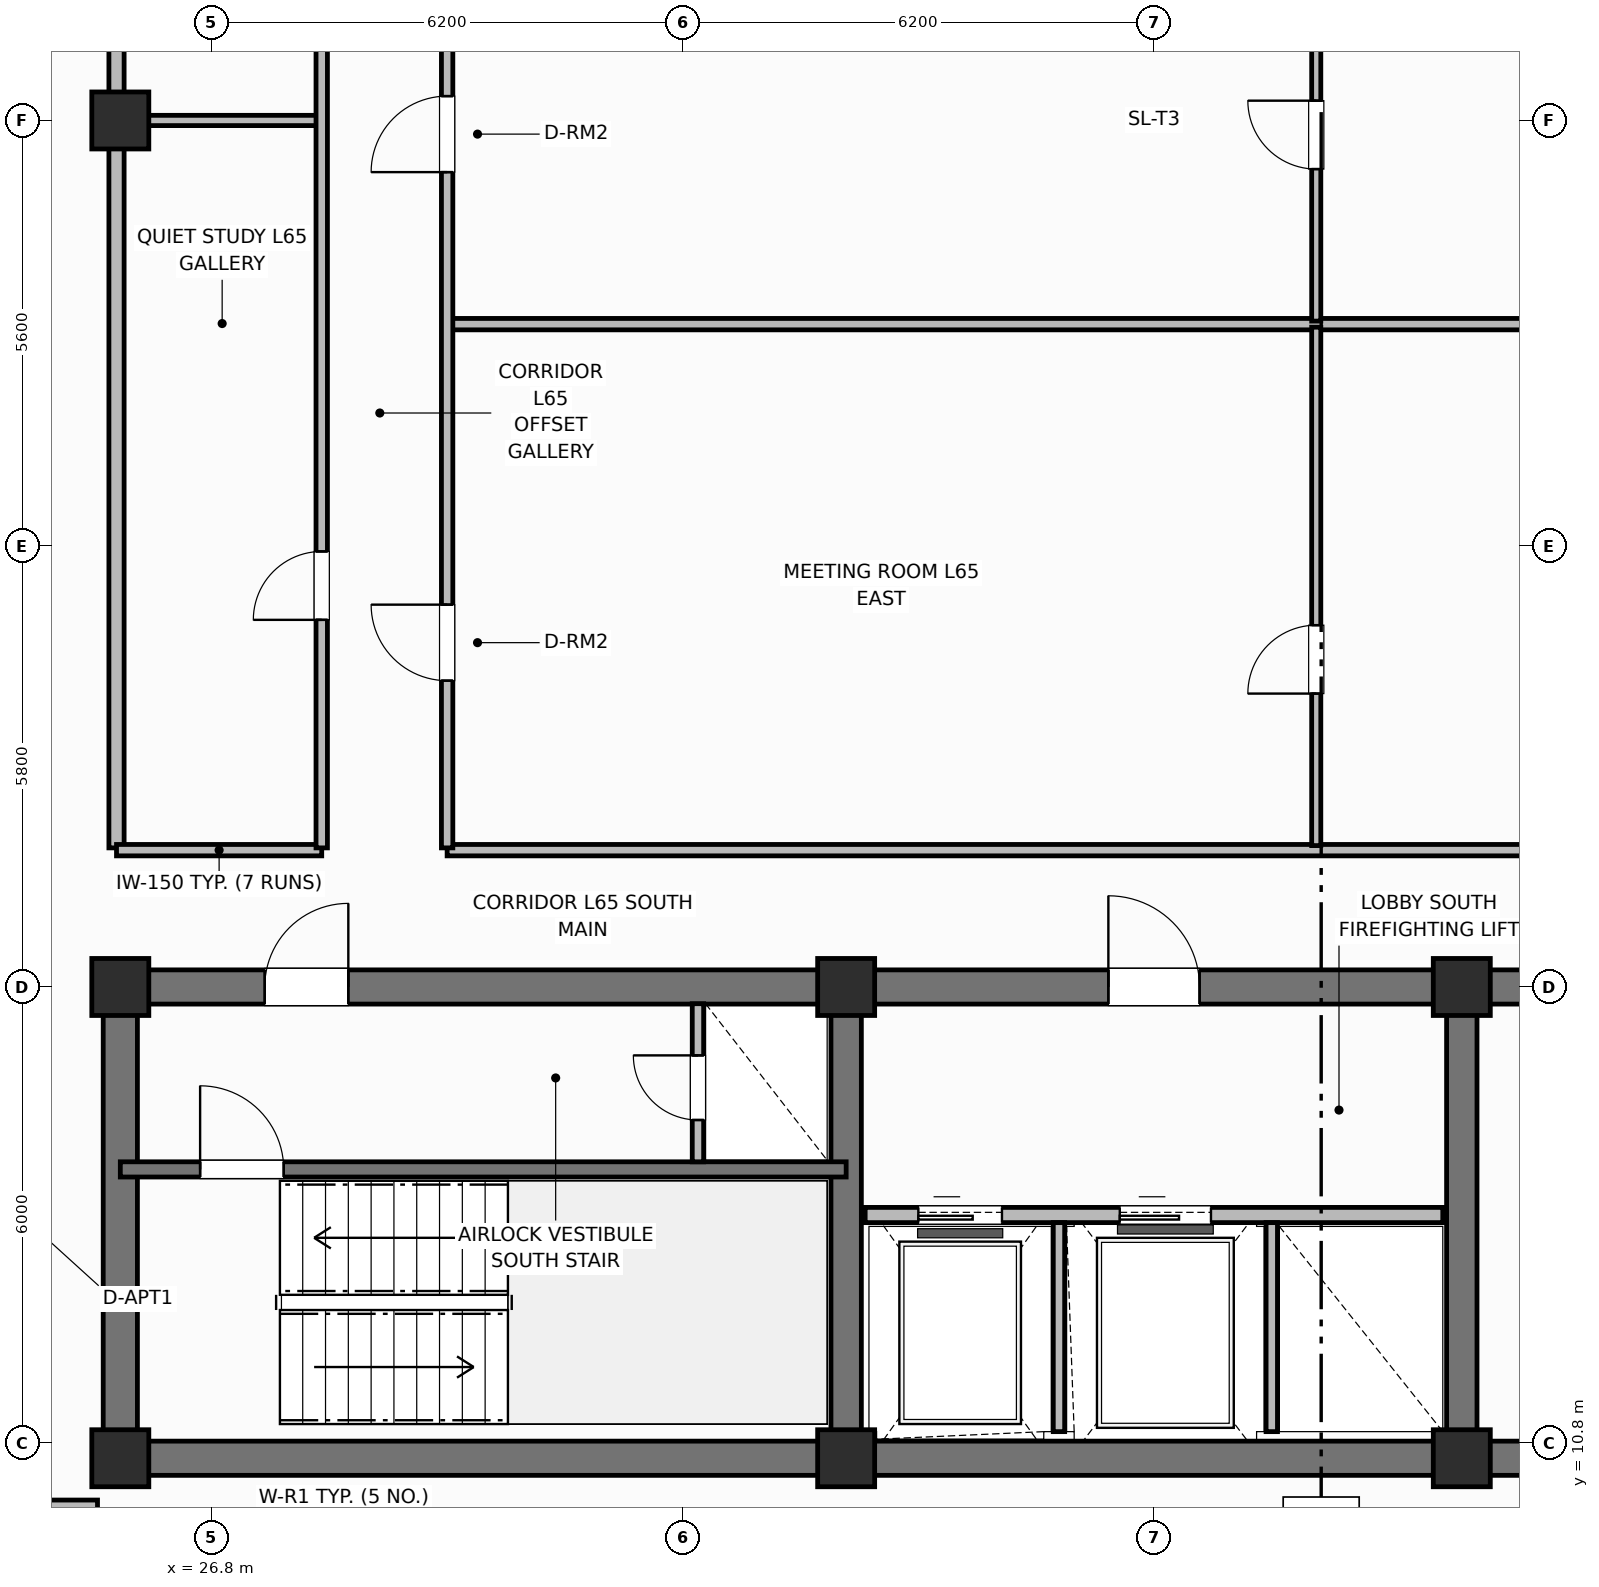
"""IFC4 building model, lengths in metres.
Left out: names, types, materials, properties, quantities, classifications, styles, units other than length and angle.
Written with IfcOpenShell. Run it as: python <this file> out.ifc"""

import sys

from ifc_helpers import new_model, si_unit, direction, frame, frame_2d, origin, origin_2d, place, context, subcontext, project, spatial, rectangle, extrude, element, fill, save


model = new_model("IFC4")
c1 = context("Model", 3, precision=1e-05, world=origin(), true_north=direction((0.0, 1.0)))
c2 = subcontext(c1, "Body", "Model", "MODEL_VIEW")
j1 = project(units=[si_unit("LENGTHUNIT", "METRE"), si_unit("PLANEANGLEUNIT", "RADIAN")], contexts=[c1])
p1 = place(None, origin())
s1 = spatial("IfcSite", under=j1, at=p1, CompositionType="ELEMENT")
p2 = place(p1, origin())
s2 = spatial("IfcBuilding", under=s1, at=p2, CompositionType="ELEMENT")
p3 = place(p2, frame((0.0, 0.0, 260.2)))
s3 = spatial("IfcBuildingStorey", under=s2, at=p3, CompositionType="ELEMENT", Elevation=260.2)
p4 = place(p3, frame((52.8, 10.6, 0.0), z_axis=(0.0, 0.0, 1.0), x_axis=(-1.0, 0.0, 0.0)))
e1 = element("IfcWall", 1, at=p4, inside=s3, PredefinedType="SHEAR", context=c2, shape_type="SweptSolid", body=[
    extrude(rectangle(XDim=27.2, YDim=0.45, at=frame_2d((13.6, 0.0))), origin(), (0.0, 0.0, 1.0), 3.7),
])
p5 = place(p3, frame((25.6, 10.825, 0.0), z_axis=(0.0, 0.0, 1.0), x_axis=(0.0, 1.0, 0.0)))
e2 = element("IfcWall", 2, at=p5, inside=s3, PredefinedType="SHEAR", context=c2, shape_type="SweptSolid", body=[
    extrude(rectangle(XDim=5.75, YDim=0.45, at=frame_2d((2.875, 0.0))), origin(), (0.0, 0.0, 1.0), 3.7),
])
p6 = place(p3, frame((25.6, 16.8, 0.0), z_axis=(0.0, 0.0, 1.0), x_axis=(1.0, 0.0, 0.0)))
e3 = element("IfcWall", 3, at=p6, inside=s3, PredefinedType="SHEAR", context=c2, shape_type="SweptSolid", body=[
    extrude(rectangle(XDim=27.2, YDim=0.45, at=frame_2d((13.6, 0.0))), origin(), (0.0, 0.0, 1.0), 3.7),
])
p7 = place(p6, frame((1.9, 0.0, 0.0)))
e4 = element("IfcOpeningElement", 4, at=p7, cuts=e3, PredefinedType="OPENING", context=c2, shape_type="SweptSolid", body=[
    extrude(rectangle(XDim=1.1, YDim=2.15, at=frame_2d((0.55, 1.075))), frame((0.0, 0.235, 0.0), z_axis=(0.0, -1.0, 0.0), x_axis=(1.0, 0.0, 0.0)), (0.0, 0.0, 1.0), 0.47),
])
p8 = place(p6, frame((13.0, 0.0, 0.0)))
e5 = element("IfcOpeningElement", 5, at=p8, cuts=e3, PredefinedType="OPENING", context=c2, shape_type="SweptSolid", body=[
    extrude(rectangle(XDim=1.2, YDim=2.15, at=frame_2d((0.6, 1.075))), frame((0.0, 0.235, 0.0), z_axis=(0.0, -1.0, 0.0), x_axis=(1.0, 0.0, 0.0)), (0.0, 0.0, 1.0), 0.47),
])
p9 = place(p6, frame((21.6, 0.0, 0.0)))
e6 = element("IfcOpeningElement", 6, at=p9, cuts=e3, PredefinedType="OPENING", context=c2, shape_type="SweptSolid", body=[
    extrude(rectangle(XDim=1.0, YDim=2.15, at=frame_2d((0.5, 1.075))), frame((0.0, 0.235, 0.0), z_axis=(0.0, -1.0, 0.0), x_axis=(1.0, 0.0, 0.0)), (0.0, 0.0, 1.0), 0.47),
])
for number, where, z_axis, x_axis in (
    (7, (35.15, 10.825, 0.0), (0.0, 0.0, 1.0), (0.0, 1.0, 0.0)),
    (8, (43.25, 10.825, 0.0), (0.0, 0.0, 1.0), (0.0, 1.0, 0.0)),
):
    element("IfcWall", number, at=place(p3, frame(where, z_axis=z_axis, x_axis=x_axis)), inside=s3, PredefinedType="SHEAR", context=c2, shape_type="SweptSolid", body=[
        extrude(rectangle(XDim=5.75, YDim=0.4, at=frame_2d((2.875, 0.0))), origin(), (0.0, 0.0, 1.0), 3.7),
    ])
for number, where, z_axis, x_axis in (
    (9, (25.6, 10.6, 0.0), (0.0, 0.0, 1.0), (1.0, 0.0, 0.0)),
    (10, (25.6, 16.8, 0.0), (0.0, 0.0, 1.0), (1.0, 0.0, 0.0)),
    (11, (35.15, 10.6, 0.0), (0.0, 0.0, 1.0), (1.0, 0.0, 0.0)),
    (12, (35.15, 16.8, 0.0), (0.0, 0.0, 1.0), (1.0, 0.0, 0.0)),
    (13, (43.25, 10.6, 0.0), (0.0, 0.0, 1.0), (1.0, 0.0, 0.0)),
    (14, (43.25, 16.8, 0.0), (0.0, 0.0, 1.0), (1.0, 0.0, 0.0)),
    (15, (25.6, 28.2, 0.0), (0.0, 0.0, 1.0), (1.0, 0.0, 0.0)),
):
    element("IfcColumn", number, at=place(p3, frame(where, z_axis=z_axis, x_axis=x_axis)), inside=s3, PredefinedType="COLUMN", context=c2, shape_type="SweptSolid", body=[
        extrude(rectangle(XDim=0.75, YDim=0.75, at=origin_2d()), origin(), (0.0, 0.0, 1.0), 3.7),
    ])
p10 = place(p3, frame((25.6, 14.4, 0.0), z_axis=(0.0, 0.0, 1.0), x_axis=(1.0, 0.0, 0.0)))
e16 = element("IfcWall", 16, at=p10, inside=s3, PredefinedType="SHEAR", context=c2, shape_type="SweptSolid", body=[
    extrude(rectangle(XDim=9.55, YDim=0.2, at=frame_2d((4.775, 0.0))), origin(), (0.0, 0.0, 1.0), 3.7),
])
p11 = place(p10, frame((1.05, 0.0, 0.0)))
e17 = element("IfcOpeningElement", 17, at=p11, cuts=e16, PredefinedType="OPENING", context=c2, shape_type="SweptSolid", body=[
    extrude(rectangle(XDim=1.1, YDim=2.15, at=frame_2d((0.55, 1.075))), frame((0.0, 0.11, 0.0), z_axis=(0.0, -1.0, 0.0), x_axis=(1.0, 0.0, 0.0)), (0.0, 0.0, 1.0), 0.22),
])
p12 = place(p3, frame((33.2, 14.5, 0.0), z_axis=(0.0, 0.0, 1.0), x_axis=(0.0, 1.0, 0.0)))
e18 = element("IfcWall", 18, at=p12, inside=s3, PredefinedType="PARTITIONING", context=c2, shape_type="SweptSolid", body=[
    extrude(rectangle(XDim=2.08, YDim=0.15, at=frame_2d((1.04, 0.0))), origin(), (0.0, 0.0, 1.0), 2.56),
])
p13 = place(p12, frame((0.55, 0.0, 0.0)))
e19 = element("IfcOpeningElement", 19, at=p13, cuts=e18, PredefinedType="OPENING", context=c2, shape_type="SweptSolid", body=[
    extrude(rectangle(XDim=0.85, YDim=2.05, at=frame_2d((0.425, 1.025))), frame((0.0, 0.085, 0.0), z_axis=(0.0, -1.0, 0.0), x_axis=(1.0, 0.0, 0.0)), (0.0, 0.0, 1.0), 0.17),
])
p14 = place(p3, frame((35.4, 13.8, 0.0), z_axis=(0.0, 0.0, 1.0), x_axis=(1.0, 0.0, 0.0)))
e20 = element("IfcWall", 20, at=p14, inside=s3, PredefinedType="PARTITIONING", context=c2, shape_type="SweptSolid", body=[
    extrude(rectangle(XDim=7.6, YDim=0.2, at=frame_2d((3.8, 0.0))), origin(), (0.0, 0.0, 1.0), 2.33),
])
p15 = place(p14, frame((0.7, 0.0, 0.0)))
e21 = element("IfcOpeningElement", 21, at=p15, cuts=e20, PredefinedType="OPENING", context=c2, shape_type="SweptSolid", body=[
    extrude(rectangle(XDim=1.1, YDim=2.15, at=frame_2d((0.55, 1.075))), frame((0.0, 0.11, 0.0), z_axis=(0.0, -1.0, 0.0), x_axis=(1.0, 0.0, 0.0)), (0.0, 0.0, 1.0), 0.22),
])
p16 = place(p14, frame((3.35, 0.0, 0.0)))
e22 = element("IfcOpeningElement", 22, at=p16, cuts=e20, PredefinedType="OPENING", context=c2, shape_type="SweptSolid", body=[
    extrude(rectangle(XDim=1.2, YDim=2.15, at=frame_2d((0.6, 1.075))), frame((0.0, 0.11, 0.0), z_axis=(0.0, -1.0, 0.0), x_axis=(1.0, 0.0, 0.0)), (0.0, 0.0, 1.0), 0.22),
])
for number, where, z_axis, x_axis in (
    (23, (37.95, 10.95, 0.0), (0.0, 0.0, 1.0), (0.0, 1.0, 0.0)),
    (24, (40.75, 10.95, 0.0), (0.0, 0.0, 1.0), (0.0, 1.0, 0.0)),
):
    element("IfcWall", number, at=place(p3, frame(where, z_axis=z_axis, x_axis=x_axis)), inside=s3, PredefinedType="PARTITIONING", context=c2, shape_type="SweptSolid", body=[
        extrude(rectangle(XDim=2.75, YDim=0.15, at=frame_2d((1.375, 0.0))), origin(), (0.0, 0.0, 1.0), 2.56),
    ])
p17 = place(p3, frame((25.55, 18.63, 0.0), z_axis=(0.0, 0.0, 1.0), x_axis=(0.0, 1.0, 0.0)))
e25 = element("IfcWall", 25, at=p17, inside=s3, PredefinedType="PARTITIONING", context=c2, shape_type="SweptSolid", body=[
    extrude(rectangle(XDim=19.14, YDim=0.2, at=frame_2d((9.57, 0.0))), origin(), (0.0, 0.0, 1.0), 2.56),
])
p18 = place(p3, frame((25.55, 18.6, 0.0), z_axis=(0.0, 0.0, 1.0), x_axis=(1.0, 0.0, 0.0)))
e26 = element("IfcWall", 26, at=p18, inside=s3, PredefinedType="PARTITIONING", context=c2, shape_type="SweptSolid", body=[
    extrude(rectangle(XDim=2.7, YDim=0.15, at=frame_2d((1.35, 0.0))), origin(), (0.0, 0.0, 1.0), 2.56),
])
p19 = place(p3, frame((29.9, 18.6, 0.0), z_axis=(0.0, 0.0, 1.0), x_axis=(1.0, 0.0, 0.0)))
e27 = element("IfcWall", 27, at=p19, inside=s3, PredefinedType="PARTITIONING", context=c2, shape_type="SweptSolid", body=[
    extrude(rectangle(XDim=22.95, YDim=0.15, at=frame_2d((11.475, 0.0))), origin(), (0.0, 0.0, 1.0), 2.56),
])
p20 = place(p3, frame((25.6, 28.2, 0.0), z_axis=(0.0, 0.0, 1.0), x_axis=(1.0, 0.0, 0.0)))
e28 = element("IfcWall", 28, at=p20, inside=s3, PredefinedType="PARTITIONING", context=c2, shape_type="SweptSolid", body=[
    extrude(rectangle(XDim=2.66, YDim=0.135, at=frame_2d((1.33, 0.0))), origin(), (0.0, 0.0, 1.0), 2.56),
])
p21 = place(p3, frame((29.93, 25.521, 0.0), z_axis=(0.0, 0.0, 1.0), x_axis=(1.0, 0.0, 0.0)))
e29 = element("IfcWall", 29, at=p21, inside=s3, PredefinedType="PARTITIONING", context=c2, shape_type="SweptSolid", body=[
    extrude(rectangle(XDim=22.87, YDim=0.15, at=frame_2d((11.435, 0.0))), origin(), (0.0, 0.0, 1.0), 2.56),
])
p22 = place(p3, frame((41.335, 18.66, 0.0), z_axis=(0.0, 0.0, 1.0), x_axis=(0.0, 1.0, 0.0)))
e30 = element("IfcWall", 30, at=p22, inside=s3, PredefinedType="PARTITIONING", context=c2, shape_type="SweptSolid", body=[
    extrude(rectangle(XDim=6.821, YDim=0.12, at=frame_2d((3.41, 0.0))), origin(), (0.0, 0.0, 1.0), 2.56),
])
p23 = place(p22, frame((2.0, 0.0, 0.0)))
e31 = element("IfcOpeningElement", 31, at=p23, cuts=e30, PredefinedType="OPENING", context=c2, shape_type="SweptSolid", body=[
    extrude(rectangle(XDim=0.9, YDim=2.1, at=frame_2d((0.45, 1.05))), frame((0.0, 0.07, 0.0), z_axis=(0.0, -1.0, 0.0), x_axis=(1.0, 0.0, 0.0)), (0.0, 0.0, 1.0), 0.14),
])
p24 = place(p3, frame((41.335, 25.56, 0.0), z_axis=(0.0, 0.0, 1.0), x_axis=(0.0, 1.0, 0.0)))
e32 = element("IfcWall", 32, at=p24, inside=s3, PredefinedType="PARTITIONING", context=c2, shape_type="SweptSolid", body=[
    extrude(rectangle(XDim=12.18, YDim=0.12, at=frame_2d((6.09, 0.0))), origin(), (0.0, 0.0, 1.0), 2.56),
])
p25 = place(p24, frame((2.0, 0.0, 0.0)))
e33 = element("IfcOpeningElement", 33, at=p25, cuts=e32, PredefinedType="OPENING", context=c2, shape_type="SweptSolid", body=[
    extrude(rectangle(XDim=0.9, YDim=2.1, at=frame_2d((0.45, 1.05))), frame((0.0, 0.07, 0.0), z_axis=(0.0, -1.0, 0.0), x_axis=(1.0, 0.0, 0.0)), (0.0, 0.0, 1.0), 0.14),
])
p26 = place(p3, frame((28.25, 18.63, 0.0), z_axis=(0.0, 0.0, 1.0), x_axis=(0.0, 1.0, 0.0)))
e34 = element("IfcWall", 34, at=p26, inside=s3, PredefinedType="PARTITIONING", context=c2, shape_type="SweptSolid", body=[
    extrude(rectangle(XDim=19.14, YDim=0.15, at=frame_2d((9.57, 0.0))), origin(), (0.0, 0.0, 1.0), 2.56),
])
p27 = place(p26, frame((3.0, 0.0, 0.0)))
e35 = element("IfcOpeningElement", 35, at=p27, cuts=e34, PredefinedType="OPENING", context=c2, shape_type="SweptSolid", body=[
    extrude(rectangle(XDim=0.9, YDim=2.1, at=frame_2d((0.45, 1.05))), frame((0.0, 0.085, 0.0), z_axis=(0.0, -1.0, 0.0), x_axis=(1.0, 0.0, 0.0)), (0.0, 0.0, 1.0), 0.17),
])
p28 = place(p26, frame((11.5, 0.0, 0.0)))
e36 = element("IfcOpeningElement", 36, at=p28, cuts=e34, PredefinedType="OPENING", context=c2, shape_type="SweptSolid", body=[
    extrude(rectangle(XDim=0.9, YDim=2.1, at=frame_2d((0.45, 1.05))), frame((0.0, 0.085, 0.0), z_axis=(0.0, -1.0, 0.0), x_axis=(1.0, 0.0, 0.0)), (0.0, 0.0, 1.0), 0.17),
])
p29 = place(p3, frame((29.9, 18.63, 0.0), z_axis=(0.0, 0.0, 1.0), x_axis=(0.0, 1.0, 0.0)))
e37 = element("IfcWall", 37, at=p29, inside=s3, PredefinedType="PARTITIONING", context=c2, shape_type="SweptSolid", body=[
    extrude(rectangle(XDim=19.14, YDim=0.15, at=frame_2d((9.57, 0.0))), origin(), (0.0, 0.0, 1.0), 2.56),
])
p30 = place(p29, frame((2.2, 0.0, 0.0)))
e38 = element("IfcOpeningElement", 38, at=p30, cuts=e37, PredefinedType="OPENING", context=c2, shape_type="SweptSolid", body=[
    extrude(rectangle(XDim=1.0, YDim=2.15, at=frame_2d((0.5, 1.075))), frame((0.0, 0.085, 0.0), z_axis=(0.0, -1.0, 0.0), x_axis=(1.0, 0.0, 0.0)), (0.0, 0.0, 1.0), 0.17),
])
p31 = place(p29, frame((8.89, 0.0, 0.0)))
e39 = element("IfcOpeningElement", 39, at=p31, cuts=e37, PredefinedType="OPENING", context=c2, shape_type="SweptSolid", body=[
    extrude(rectangle(XDim=1.0, YDim=2.15, at=frame_2d((0.5, 1.075))), frame((0.0, 0.085, 0.0), z_axis=(0.0, -1.0, 0.0), x_axis=(1.0, 0.0, 0.0)), (0.0, 0.0, 1.0), 0.17),
])
p32 = place(p3, frame((21.546, 9.95, 0.0), z_axis=(0.0, 0.0, 1.0), x_axis=(1.0, 0.0, 0.0)))
e40 = element("IfcWall", 40, at=p32, inside=s3, PredefinedType="PARTITIONING", context=c2, shape_type="SweptSolid", body=[
    extrude(rectangle(XDim=3.754, YDim=0.2, at=frame_2d((1.877, 0.0))), origin(), (0.0, 0.0, 1.0), 2.56),
])
p33 = place(p11, origin())
e41 = element("IfcDoor", 41, at=p33, inside=s3, OperationType="SINGLE_SWING_LEFT", PredefinedType="DOOR", context=c2, shape_type="SweptSolid", body=[
    extrude(rectangle(XDim=1.1, YDim=2.15, at=frame_2d((0.55, 1.075))), frame((0.0, 0.025, 0.0), z_axis=(0.0, -1.0, 0.0), x_axis=(1.0, 0.0, 0.0)), (0.0, 0.0, 1.0), 0.05),
])
fill(e17, e41)
p34 = place(p13, origin())
e42 = element("IfcDoor", 42, at=p34, inside=s3, OperationType="SINGLE_SWING_RIGHT", PredefinedType="TRAPDOOR", context=c2, shape_type="SweptSolid", body=[
    extrude(rectangle(XDim=0.85, YDim=2.05, at=frame_2d((0.425, 1.025))), frame((0.0, 0.025, 0.0), z_axis=(0.0, -1.0, 0.0), x_axis=(1.0, 0.0, 0.0)), (0.0, 0.0, 1.0), 0.05),
])
fill(e19, e42)
p35 = place(p15, origin())
e43 = element("IfcDoor", 43, at=p35, inside=s3, OperationType="SLIDING_TO_LEFT", PredefinedType="DOOR", context=c2, shape_type="SweptSolid", body=[
    extrude(rectangle(XDim=1.1, YDim=2.15, at=frame_2d((0.55, 1.075))), frame((0.0, 0.025, 0.0), z_axis=(0.0, -1.0, 0.0), x_axis=(1.0, 0.0, 0.0)), (0.0, 0.0, 1.0), 0.05),
])
fill(e21, e43)
p36 = place(p16, origin())
e44 = element("IfcDoor", 44, at=p36, inside=s3, OperationType="SLIDING_TO_LEFT", PredefinedType="DOOR", context=c2, shape_type="SweptSolid", body=[
    extrude(rectangle(XDim=1.2, YDim=2.15, at=frame_2d((0.6, 1.075))), frame((0.0, 0.025, 0.0), z_axis=(0.0, -1.0, 0.0), x_axis=(1.0, 0.0, 0.0)), (0.0, 0.0, 1.0), 0.05),
])
fill(e22, e44)
p37 = place(p23, origin())
e45 = element("IfcDoor", 45, at=p37, inside=s3, OperationType="SINGLE_SWING_LEFT", PredefinedType="DOOR", context=c2, shape_type="SweptSolid", body=[
    extrude(rectangle(XDim=0.9, YDim=2.1, at=frame_2d((0.45, 1.05))), frame((0.0, 0.025, 0.0), z_axis=(0.0, -1.0, 0.0), x_axis=(1.0, 0.0, 0.0)), (0.0, 0.0, 1.0), 0.05),
])
fill(e31, e45)
p38 = place(p25, origin())
e46 = element("IfcDoor", 46, at=p38, inside=s3, OperationType="SINGLE_SWING_RIGHT", PredefinedType="DOOR", context=c2, shape_type="SweptSolid", body=[
    extrude(rectangle(XDim=0.9, YDim=2.1, at=frame_2d((0.45, 1.05))), frame((0.0, 0.025, 0.0), z_axis=(0.0, -1.0, 0.0), x_axis=(1.0, 0.0, 0.0)), (0.0, 0.0, 1.0), 0.05),
])
fill(e33, e46)
p39 = place(p27, origin())
e47 = element("IfcDoor", 47, at=p39, inside=s3, OperationType="SINGLE_SWING_LEFT", PredefinedType="DOOR", context=c2, shape_type="SweptSolid", body=[
    extrude(rectangle(XDim=0.9, YDim=2.1, at=frame_2d((0.45, 1.05))), frame((0.0, 0.025, 0.0), z_axis=(0.0, -1.0, 0.0), x_axis=(1.0, 0.0, 0.0)), (0.0, 0.0, 1.0), 0.05),
])
fill(e35, e47)
p40 = place(p30, origin())
e48 = element("IfcDoor", 48, at=p40, inside=s3, OperationType="SINGLE_SWING_RIGHT", PredefinedType="DOOR", context=c2, shape_type="SweptSolid", body=[
    extrude(rectangle(XDim=1.0, YDim=2.15, at=frame_2d((0.5, 1.075))), frame((0.0, 0.025, 0.0), z_axis=(0.0, -1.0, 0.0), x_axis=(1.0, 0.0, 0.0)), (0.0, 0.0, 1.0), 0.05),
])
fill(e38, e48)
p41 = place(p31, origin())
e49 = element("IfcDoor", 49, at=p41, inside=s3, OperationType="SINGLE_SWING_LEFT", PredefinedType="DOOR", context=c2, shape_type="SweptSolid", body=[
    extrude(rectangle(XDim=1.0, YDim=2.15, at=frame_2d((0.5, 1.075))), frame((0.0, 0.025, 0.0), z_axis=(0.0, -1.0, 0.0), x_axis=(1.0, 0.0, 0.0)), (0.0, 0.0, 1.0), 0.05),
])
fill(e39, e49)
p42 = place(p7, origin())
e50 = element("IfcDoor", 50, at=p42, inside=s3, OperationType="SINGLE_SWING_RIGHT", PredefinedType="DOOR", context=c2, shape_type="SweptSolid", body=[
    extrude(rectangle(XDim=1.1, YDim=2.15, at=frame_2d((0.55, 1.075))), frame((0.0, 0.025, 0.0), z_axis=(0.0, -1.0, 0.0), x_axis=(1.0, 0.0, 0.0)), (0.0, 0.0, 1.0), 0.05),
])
fill(e4, e50)
p43 = place(p8, origin())
e51 = element("IfcDoor", 51, at=p43, inside=s3, OperationType="SINGLE_SWING_LEFT", PredefinedType="DOOR", context=c2, shape_type="SweptSolid", body=[
    extrude(rectangle(XDim=1.2, YDim=2.15, at=frame_2d((0.6, 1.075))), frame((0.0, 0.025, 0.0), z_axis=(0.0, -1.0, 0.0), x_axis=(1.0, 0.0, 0.0)), (0.0, 0.0, 1.0), 0.05),
])
fill(e5, e51)
save(model, sys.argv[1])
